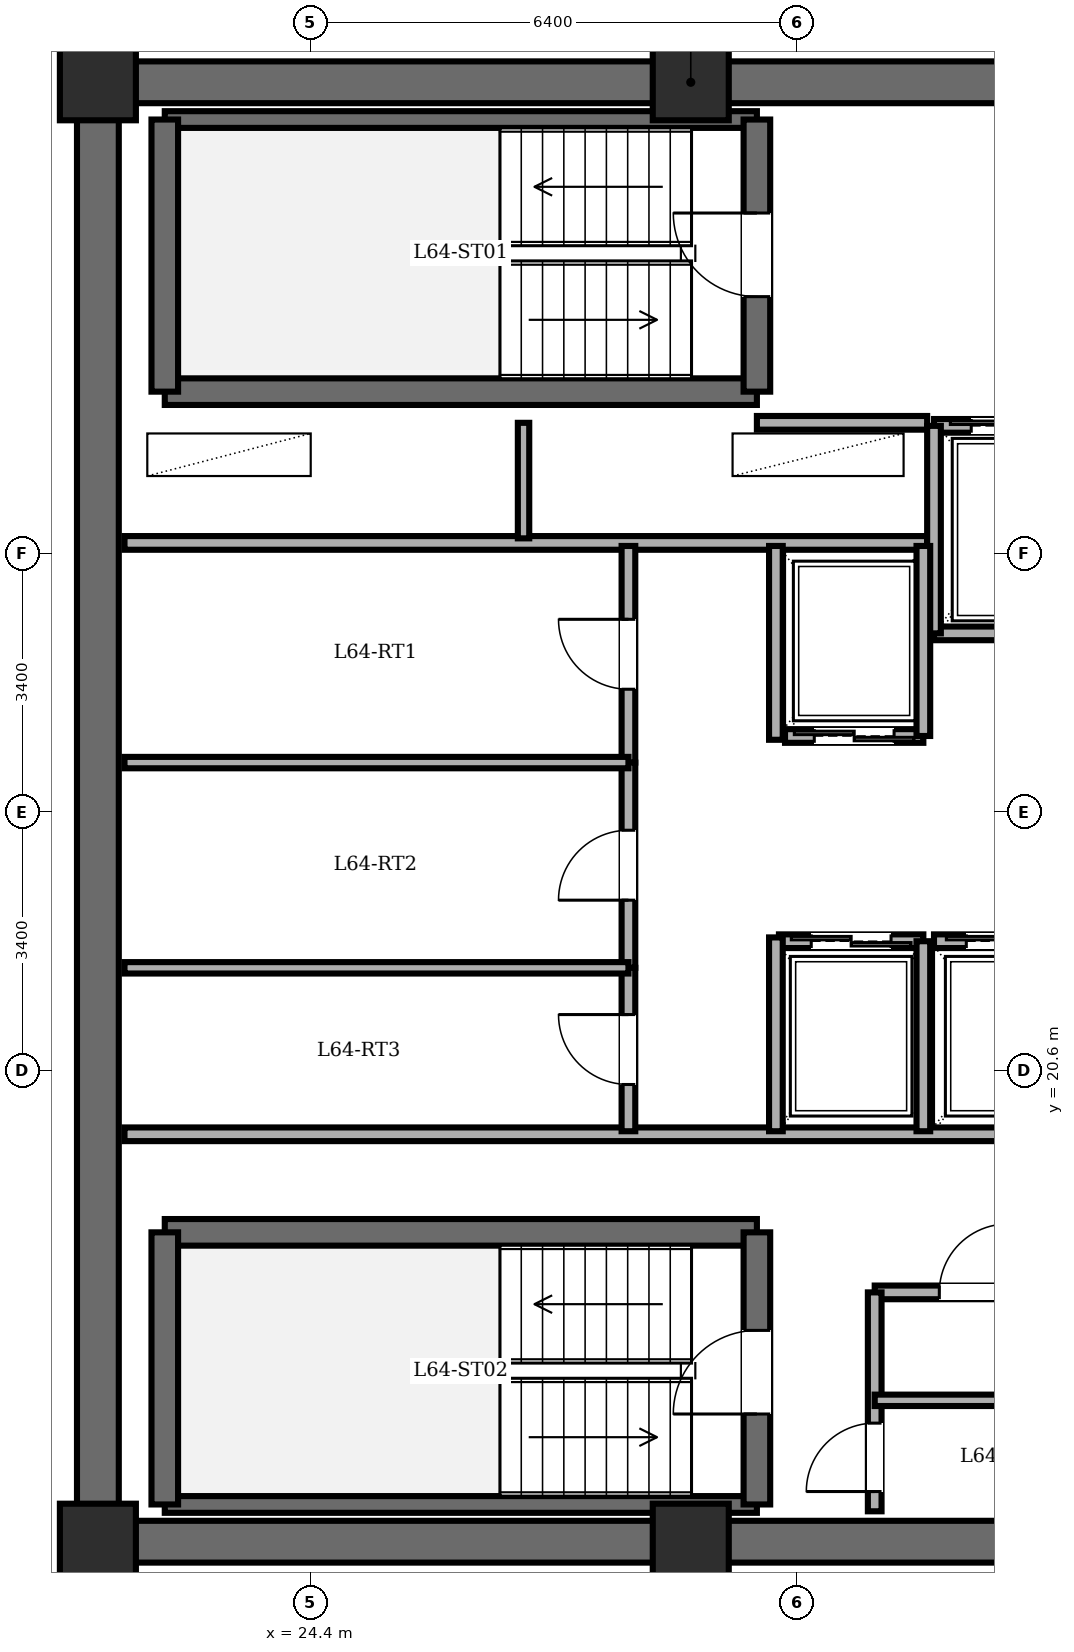
"""IFC4 building model, lengths in metres.
Left out: names, types, materials, properties, quantities, classifications, styles, units other than length and angle.
Written with IfcOpenShell. Run it as: python <this file> out.ifc"""

import sys

from ifc_helpers import new_model, si_unit, direction, frame, frame_2d, origin, origin_2d, place, context, subcontext, project, spatial, rectangle, extrude, element, fill, save


model = new_model("IFC4")
c1 = context("Model", 3, precision=1e-05, world=origin(), true_north=direction((0.0, 1.0)))
c2 = subcontext(c1, "Body", "Model", "MODEL_VIEW")
j1 = project(units=[si_unit("LENGTHUNIT", "METRE"), si_unit("PLANEANGLEUNIT", "RADIAN")], contexts=[c1])
p1 = place(None, origin())
s1 = spatial("IfcSite", under=j1, at=p1, CompositionType="ELEMENT")
p2 = place(p1, origin())
s2 = spatial("IfcBuilding", under=s1, at=p2, CompositionType="ELEMENT")
p3 = place(p2, frame((0.0, 0.0, 244.5)))
s3 = spatial("IfcBuildingStorey", under=s2, at=p3, CompositionType="ELEMENT", Elevation=244.5)
for number, where, z_axis, x_axis in (
    (1, (21.6, 14.4, 0.0), (0.0, 0.0, 1.0), (1.0, 0.0, 0.0)),
    (2, (29.4, 14.4, 0.0), (0.0, 0.0, 1.0), (1.0, 0.0, 0.0)),
    (3, (29.4, 33.6, 0.0), (0.0, 0.0, 1.0), (1.0, 0.0, 0.0)),
    (4, (21.6, 33.6, 0.0), (0.0, 0.0, 1.0), (1.0, 0.0, 0.0)),
):
    element("IfcColumn", number, at=place(p3, frame(where, z_axis=z_axis, x_axis=x_axis)), inside=s3, PredefinedType="COLUMN", context=c2, shape_type="SweptSolid", body=[
        extrude(rectangle(XDim=1.0, YDim=1.0, at=origin_2d()), origin(), (0.0, 0.0, 1.0), 3.6),
    ])
p4 = place(p3, frame((21.6, 14.4, 0.0), z_axis=(0.0, 0.0, 1.0), x_axis=(0.0, 1.0, 0.0)))
e5 = element("IfcWall", 5, at=p4, inside=s3, PredefinedType="SHEAR", context=c2, shape_type="SweptSolid", body=[
    extrude(rectangle(XDim=19.2, YDim=0.55, at=frame_2d((9.6, 0.0))), origin(), (0.0, 0.0, 1.0), 3.36),
])
for number, where, z_axis, x_axis in (
    (6, (21.6, 33.6, 0.0), (0.0, 0.0, 1.0), (1.0, 0.0, 0.0)),
    (7, (37.2, 14.4, 0.0), (0.0, 0.0, 1.0), (-1.0, 0.0, 0.0)),
):
    element("IfcWall", number, at=place(p3, frame(where, z_axis=z_axis, x_axis=x_axis)), inside=s3, PredefinedType="SHEAR", context=c2, shape_type="SweptSolid", body=[
        extrude(rectangle(XDim=15.6, YDim=0.55, at=frame_2d((7.8, 0.0))), origin(), (0.0, 0.0, 1.0), 3.36),
    ])
p5 = place(p3, frame((22.48, 29.53, 0.0), z_axis=(0.0, 0.0, 1.0), x_axis=(1.0, 0.0, 0.0)))
e8 = element("IfcWall", 8, at=p5, inside=s3, PredefinedType="SOLIDWALL", context=c2, shape_type="SweptSolid", body=[
    extrude(rectangle(XDim=7.79, YDim=0.35, at=frame_2d((3.895, 0.0))), origin(), (0.0, 0.0, 1.0), 3.36),
])
p6 = place(p3, frame((22.48, 33.11, 0.0), z_axis=(0.0, 0.0, 1.0), x_axis=(1.0, 0.0, 0.0)))
e9 = element("IfcWall", 9, at=p6, inside=s3, PredefinedType="PARTITIONING", context=c2, shape_type="SweptSolid", body=[
    extrude(rectangle(XDim=7.79, YDim=0.22, at=frame_2d((3.895, 0.0))), origin(), (0.0, 0.0, 1.0), 3.36),
])
p7 = place(p3, frame((22.48, 29.53, 0.0), z_axis=(0.0, 0.0, 1.0), x_axis=(0.0, 1.0, 0.0)))
e10 = element("IfcWall", 10, at=p7, inside=s3, PredefinedType="SOLIDWALL", context=c2, shape_type="SweptSolid", body=[
    extrude(rectangle(XDim=3.58, YDim=0.35, at=frame_2d((1.79, 0.0))), origin(), (0.0, 0.0, 1.0), 3.36),
])
p8 = place(p3, frame((30.27, 29.53, 0.0), z_axis=(0.0, 0.0, 1.0), x_axis=(0.0, 1.0, 0.0)))
e11 = element("IfcWall", 11, at=p8, inside=s3, PredefinedType="SOLIDWALL", context=c2, shape_type="SweptSolid", body=[
    extrude(rectangle(XDim=3.58, YDim=0.35, at=frame_2d((1.79, 0.0))), origin(), (0.0, 0.0, 1.0), 3.36),
])
p9 = place(p8, frame((1.25, 0.0, 0.0)))
e12 = element("IfcOpeningElement", 12, at=p9, cuts=e11, PredefinedType="OPENING", context=c2, shape_type="SweptSolid", body=[
    extrude(rectangle(XDim=1.1, YDim=2.15, at=frame_2d((0.55, 1.075))), frame((0.0, 0.185, 0.0), z_axis=(0.0, -1.0, 0.0), x_axis=(1.0, 0.0, 0.0)), (0.0, 0.0, 1.0), 0.37),
])
p10 = place(p3, frame((22.48, 18.47, 0.0), z_axis=(0.0, 0.0, 1.0), x_axis=(1.0, 0.0, 0.0)))
e13 = element("IfcWall", 13, at=p10, inside=s3, PredefinedType="SOLIDWALL", context=c2, shape_type="SweptSolid", body=[
    extrude(rectangle(XDim=7.79, YDim=0.35, at=frame_2d((3.895, 0.0))), origin(), (0.0, 0.0, 1.0), 3.36),
])
p11 = place(p3, frame((22.48, 14.89, 0.0), z_axis=(0.0, 0.0, 1.0), x_axis=(1.0, 0.0, 0.0)))
e14 = element("IfcWall", 14, at=p11, inside=s3, PredefinedType="PARTITIONING", context=c2, shape_type="SweptSolid", body=[
    extrude(rectangle(XDim=7.79, YDim=0.22, at=frame_2d((3.895, 0.0))), origin(), (0.0, 0.0, 1.0), 3.36),
])
p12 = place(p3, frame((22.48, 14.89, 0.0), z_axis=(0.0, 0.0, 1.0), x_axis=(0.0, 1.0, 0.0)))
e15 = element("IfcWall", 15, at=p12, inside=s3, PredefinedType="SOLIDWALL", context=c2, shape_type="SweptSolid", body=[
    extrude(rectangle(XDim=3.58, YDim=0.35, at=frame_2d((1.79, 0.0))), origin(), (0.0, 0.0, 1.0), 3.36),
])
p13 = place(p3, frame((30.27, 14.89, 0.0), z_axis=(0.0, 0.0, 1.0), x_axis=(0.0, 1.0, 0.0)))
e16 = element("IfcWall", 16, at=p13, inside=s3, PredefinedType="SOLIDWALL", context=c2, shape_type="SweptSolid", body=[
    extrude(rectangle(XDim=3.58, YDim=0.35, at=frame_2d((1.79, 0.0))), origin(), (0.0, 0.0, 1.0), 3.36),
])
p14 = place(p13, frame((1.19, 0.0, 0.0)))
e17 = element("IfcOpeningElement", 17, at=p14, cuts=e16, PredefinedType="OPENING", context=c2, shape_type="SweptSolid", body=[
    extrude(rectangle(XDim=1.1, YDim=2.15, at=frame_2d((0.55, 1.075))), frame((0.0, 0.185, 0.0), z_axis=(0.0, -1.0, 0.0), x_axis=(1.0, 0.0, 0.0)), (0.0, 0.0, 1.0), 0.37),
])
p15 = place(p3, frame((30.27, 29.12, 0.0), z_axis=(0.0, 0.0, 1.0), x_axis=(1.0, 0.0, 0.0)))
e18 = element("IfcWall", 18, at=p15, inside=s3, PredefinedType="PARTITIONING", context=c2, shape_type="SweptSolid", body=[
    extrude(rectangle(XDim=2.24, YDim=0.18, at=frame_2d((1.12, 0.0))), origin(), (0.0, 0.0, 1.0), 3.36),
])
p16 = place(p3, frame((21.95, 27.54, 0.0), z_axis=(0.0, 0.0, 1.0), x_axis=(1.0, 0.0, 0.0)))
e19 = element("IfcWall", 19, at=p16, inside=s3, PredefinedType="PARTITIONING", context=c2, shape_type="SweptSolid", body=[
    extrude(rectangle(XDim=10.56, YDim=0.18, at=frame_2d((5.28, 0.0))), origin(), (0.0, 0.0, 1.0), 3.36),
])
p17 = place(p3, frame((27.2, 27.6, 0.0), z_axis=(0.0, 0.0, 1.0), x_axis=(0.0, 1.0, 0.0)))
e20 = element("IfcWall", 20, at=p17, inside=s3, PredefinedType="PARTITIONING", context=c2, shape_type="SweptSolid", body=[
    extrude(rectangle(XDim=1.52, YDim=0.15, at=frame_2d((0.76, 0.0))), origin(), (0.0, 0.0, 1.0), 3.36),
])
p18 = place(p3, frame((21.95, 19.76, 0.0), z_axis=(0.0, 0.0, 1.0), x_axis=(1.0, 0.0, 0.0)))
e21 = element("IfcWall", 21, at=p18, inside=s3, PredefinedType="PARTITIONING", context=c2, shape_type="SweptSolid", body=[
    extrude(rectangle(XDim=14.87, YDim=0.18, at=frame_2d((7.435, 0.0))), origin(), (0.0, 0.0, 1.0), 3.36),
])
p19 = place(p3, frame((31.82, 17.68, 0.0), z_axis=(0.0, 0.0, 1.0), x_axis=(1.0, 0.0, 0.0)))
e22 = element("IfcWall", 22, at=p19, inside=s3, PredefinedType="PARTITIONING", context=c2, shape_type="SweptSolid", body=[
    extrude(rectangle(XDim=2.66, YDim=0.18, at=frame_2d((1.33, 0.0))), origin(), (0.0, 0.0, 1.0), 3.36),
])
p20 = place(p19, frame((0.85, 0.0, 0.0)))
e23 = element("IfcOpeningElement", 23, at=p20, cuts=e22, PredefinedType="OPENING", context=c2, shape_type="SweptSolid", body=[
    extrude(rectangle(XDim=0.9, YDim=2.05, at=frame_2d((0.45, 1.025))), frame((0.0, 0.1, 0.0), z_axis=(0.0, -1.0, 0.0), x_axis=(1.0, 0.0, 0.0)), (0.0, 0.0, 1.0), 0.2),
])
p21 = place(p3, frame((31.82, 14.8, 0.0), z_axis=(0.0, 0.0, 1.0), x_axis=(0.0, 1.0, 0.0)))
e24 = element("IfcWall", 24, at=p21, inside=s3, PredefinedType="PARTITIONING", context=c2, shape_type="SweptSolid", body=[
    extrude(rectangle(XDim=2.88, YDim=0.18, at=frame_2d((1.44, 0.0))), origin(), (0.0, 0.0, 1.0), 3.36),
])
p22 = place(p21, frame((0.26, 0.0, 0.0)))
e25 = element("IfcOpeningElement", 25, at=p22, cuts=e24, PredefinedType="OPENING", context=c2, shape_type="SweptSolid", body=[
    extrude(rectangle(XDim=0.9, YDim=2.05, at=frame_2d((0.45, 1.025))), frame((0.0, 0.1, 0.0), z_axis=(0.0, -1.0, 0.0), x_axis=(1.0, 0.0, 0.0)), (0.0, 0.0, 1.0), 0.2),
])
p23 = place(p3, frame((31.82, 16.26, 0.0), z_axis=(0.0, 0.0, 1.0), x_axis=(1.0, 0.0, 0.0)))
e26 = element("IfcWall", 26, at=p23, inside=s3, PredefinedType="PARTITIONING", context=c2, shape_type="SweptSolid", body=[
    extrude(rectangle(XDim=2.66, YDim=0.15, at=frame_2d((1.33, 0.0))), origin(), (0.0, 0.0, 1.0), 3.36),
])
p24 = place(p3, frame((32.6, 29.08, 0.0), z_axis=(0.0, 0.0, 1.0), x_axis=(1.0, 0.0, 0.0)))
e27 = element("IfcWall", 27, at=p24, inside=s3, PredefinedType="PARTITIONING", context=c2, shape_type="SweptSolid", body=[
    extrude(rectangle(XDim=2.08, YDim=0.18, at=frame_2d((1.04, 0.0))), origin(), (0.0, 0.0, 1.0), 3.36),
])
p25 = place(p24, frame((0.49, 0.0, 0.0)))
e28 = element("IfcOpeningElement", 28, at=p25, cuts=e27, PredefinedType="OPENING", context=c2, shape_type="SweptSolid", body=[
    extrude(rectangle(XDim=1.1, YDim=2.2, at=frame_2d((0.55, 1.1))), frame((0.0, 0.1, 0.0), z_axis=(0.0, -1.0, 0.0), x_axis=(1.0, 0.0, 0.0)), (0.0, 0.0, 1.0), 0.2),
])
p26 = place(p3, frame((34.68, 26.35, 0.0), z_axis=(0.0, 0.0, 1.0), x_axis=(-1.0, 0.0, 0.0)))
e29 = element("IfcWall", 29, at=p26, inside=s3, PredefinedType="PARTITIONING", context=c2, shape_type="SweptSolid", body=[
    extrude(rectangle(XDim=2.08, YDim=0.18, at=frame_2d((1.04, 0.0))), origin(), (0.0, 0.0, 1.0), 3.36),
])
p27 = place(p3, frame((32.6, 29.08, 0.0), z_axis=(0.0, 0.0, 1.0), x_axis=(0.0, -1.0, 0.0)))
e30 = element("IfcWall", 30, at=p27, inside=s3, PredefinedType="PARTITIONING", context=c2, shape_type="SweptSolid", body=[
    extrude(rectangle(XDim=2.73, YDim=0.18, at=frame_2d((1.365, 0.0))), origin(), (0.0, 0.0, 1.0), 3.36),
])
p28 = place(p3, frame((32.46, 25.0, 0.0), z_axis=(0.0, 0.0, 1.0), x_axis=(-1.0, 0.0, 0.0)))
e31 = element("IfcWall", 31, at=p28, inside=s3, PredefinedType="PARTITIONING", context=c2, shape_type="SweptSolid", body=[
    extrude(rectangle(XDim=1.82, YDim=0.18, at=frame_2d((0.91, 0.0))), origin(), (0.0, 0.0, 1.0), 3.36),
])
p29 = place(p28, frame((0.385, 0.0, 0.0)))
e32 = element("IfcOpeningElement", 32, at=p29, cuts=e31, PredefinedType="OPENING", context=c2, shape_type="SweptSolid", body=[
    extrude(rectangle(XDim=1.05, YDim=2.2, at=frame_2d((0.525, 1.1))), frame((0.0, 0.1, 0.0), z_axis=(0.0, -1.0, 0.0), x_axis=(1.0, 0.0, 0.0)), (0.0, 0.0, 1.0), 0.2),
])
p30 = place(p3, frame((32.46, 25.0, 0.0), z_axis=(0.0, 0.0, 1.0), x_axis=(0.0, 1.0, 0.0)))
e33 = element("IfcWall", 33, at=p30, inside=s3, PredefinedType="PARTITIONING", context=c2, shape_type="SweptSolid", body=[
    extrude(rectangle(XDim=2.5, YDim=0.18, at=frame_2d((1.25, 0.0))), origin(), (0.0, 0.0, 1.0), 3.36),
])
p31 = place(p3, frame((30.56, 22.3, 0.0), z_axis=(0.0, 0.0, 1.0), x_axis=(1.0, 0.0, 0.0)))
e34 = element("IfcWall", 34, at=p31, inside=s3, PredefinedType="PARTITIONING", context=c2, shape_type="SweptSolid", body=[
    extrude(rectangle(XDim=1.9, YDim=0.18, at=frame_2d((0.95, 0.0))), origin(), (0.0, 0.0, 1.0), 3.36),
])
p32 = place(p31, frame((0.425, 0.0, 0.0)))
e35 = element("IfcOpeningElement", 35, at=p32, cuts=e34, PredefinedType="OPENING", context=c2, shape_type="SweptSolid", body=[
    extrude(rectangle(XDim=1.05, YDim=2.2, at=frame_2d((0.525, 1.1))), frame((0.0, 0.1, 0.0), z_axis=(0.0, -1.0, 0.0), x_axis=(1.0, 0.0, 0.0)), (0.0, 0.0, 1.0), 0.2),
])
p33 = place(p3, frame((32.46, 19.8, 0.0), z_axis=(0.0, 0.0, 1.0), x_axis=(0.0, 1.0, 0.0)))
e36 = element("IfcWall", 36, at=p33, inside=s3, PredefinedType="PARTITIONING", context=c2, shape_type="SweptSolid", body=[
    extrude(rectangle(XDim=2.5, YDim=0.18, at=frame_2d((1.25, 0.0))), origin(), (0.0, 0.0, 1.0), 3.36),
])
p34 = place(p3, frame((32.6, 22.3, 0.0), z_axis=(0.0, 0.0, 1.0), x_axis=(1.0, 0.0, 0.0)))
e37 = element("IfcWall", 37, at=p34, inside=s3, PredefinedType="PARTITIONING", context=c2, shape_type="SweptSolid", body=[
    extrude(rectangle(XDim=1.9, YDim=0.18, at=frame_2d((0.95, 0.0))), origin(), (0.0, 0.0, 1.0), 3.36),
])
p35 = place(p34, frame((0.425, 0.0, 0.0)))
e38 = element("IfcOpeningElement", 38, at=p35, cuts=e37, PredefinedType="OPENING", context=c2, shape_type="SweptSolid", body=[
    extrude(rectangle(XDim=1.05, YDim=2.2, at=frame_2d((0.525, 1.1))), frame((0.0, 0.1, 0.0), z_axis=(0.0, -1.0, 0.0), x_axis=(1.0, 0.0, 0.0)), (0.0, 0.0, 1.0), 0.2),
])
for number, where, z_axis, x_axis in (
    (39, (30.52, 24.95, 0.0), (0.0, 0.0, 1.0), (0.0, 1.0, 0.0)),
    (40, (30.52, 19.8, 0.0), (0.0, 0.0, 1.0), (0.0, 1.0, 0.0)),
):
    element("IfcWall", number, at=place(p3, frame(where, z_axis=z_axis, x_axis=x_axis)), inside=s3, PredefinedType="PARTITIONING", context=c2, shape_type="SweptSolid", body=[
        extrude(rectangle(XDim=2.55, YDim=0.18, at=frame_2d((1.275, 0.0))), origin(), (0.0, 0.0, 1.0), 3.36),
    ])
p36 = place(p3, frame((28.58, 24.65, 0.0), z_axis=(0.0, 0.0, 1.0), x_axis=(0.0, 1.0, 0.0)))
e41 = element("IfcWall", 41, at=p36, inside=s3, PredefinedType="PARTITIONING", context=c2, shape_type="SweptSolid", body=[
    extrude(rectangle(XDim=2.85, YDim=0.18, at=frame_2d((1.425, 0.0))), origin(), (0.0, 0.0, 1.0), 3.36),
])
p37 = place(p36, frame((0.965, 0.0, 0.0)))
e42 = element("IfcOpeningElement", 42, at=p37, cuts=e41, PredefinedType="OPENING", context=c2, shape_type="SweptSolid", body=[
    extrude(rectangle(XDim=0.92, YDim=2.1, at=frame_2d((0.46, 1.05))), frame((0.0, 0.1, 0.0), z_axis=(0.0, -1.0, 0.0), x_axis=(1.0, 0.0, 0.0)), (0.0, 0.0, 1.0), 0.2),
])
p38 = place(p3, frame((28.58, 21.95, 0.0), z_axis=(0.0, 0.0, 1.0), x_axis=(0.0, 1.0, 0.0)))
e43 = element("IfcWall", 43, at=p38, inside=s3, PredefinedType="PARTITIONING", context=c2, shape_type="SweptSolid", body=[
    extrude(rectangle(XDim=2.7, YDim=0.18, at=frame_2d((1.35, 0.0))), origin(), (0.0, 0.0, 1.0), 3.36),
])
p39 = place(p38, frame((0.89, 0.0, 0.0)))
e44 = element("IfcOpeningElement", 44, at=p39, cuts=e43, PredefinedType="OPENING", context=c2, shape_type="SweptSolid", body=[
    extrude(rectangle(XDim=0.92, YDim=2.1, at=frame_2d((0.46, 1.05))), frame((0.0, 0.1, 0.0), z_axis=(0.0, -1.0, 0.0), x_axis=(1.0, 0.0, 0.0)), (0.0, 0.0, 1.0), 0.2),
])
p40 = place(p3, frame((28.58, 19.8, 0.0), z_axis=(0.0, 0.0, 1.0), x_axis=(0.0, 1.0, 0.0)))
e45 = element("IfcWall", 45, at=p40, inside=s3, PredefinedType="PARTITIONING", context=c2, shape_type="SweptSolid", body=[
    extrude(rectangle(XDim=2.15, YDim=0.18, at=frame_2d((1.075, 0.0))), origin(), (0.0, 0.0, 1.0), 3.36),
])
p41 = place(p40, frame((0.615, 0.0, 0.0)))
e46 = element("IfcOpeningElement", 46, at=p41, cuts=e45, PredefinedType="OPENING", context=c2, shape_type="SweptSolid", body=[
    extrude(rectangle(XDim=0.92, YDim=2.1, at=frame_2d((0.46, 1.05))), frame((0.0, 0.1, 0.0), z_axis=(0.0, -1.0, 0.0), x_axis=(1.0, 0.0, 0.0)), (0.0, 0.0, 1.0), 0.2),
])
for number, where, z_axis, x_axis in (
    (47, (21.95, 24.65, 0.0), (0.0, 0.0, 1.0), (1.0, 0.0, 0.0)),
    (48, (21.95, 21.95, 0.0), (0.0, 0.0, 1.0), (1.0, 0.0, 0.0)),
):
    element("IfcWall", number, at=place(p3, frame(where, z_axis=z_axis, x_axis=x_axis)), inside=s3, PredefinedType="PARTITIONING", context=c2, shape_type="SweptSolid", body=[
        extrude(rectangle(XDim=6.63, YDim=0.15, at=frame_2d((3.315, 0.0))), origin(), (0.0, 0.0, 1.0), 3.36),
    ])
p42 = place(p9, origin())
e49 = element("IfcDoor", 49, at=p42, inside=s3, OperationType="SINGLE_SWING_RIGHT", PredefinedType="DOOR", context=c2, shape_type="SweptSolid", body=[
    extrude(rectangle(XDim=1.1, YDim=2.15, at=frame_2d((0.55, 1.075))), frame((0.0, 0.025, 0.0), z_axis=(0.0, -1.0, 0.0), x_axis=(1.0, 0.0, 0.0)), (0.0, 0.0, 1.0), 0.05),
])
fill(e12, e49)
p43 = place(p14, origin())
e50 = element("IfcDoor", 50, at=p43, inside=s3, OperationType="SINGLE_SWING_LEFT", PredefinedType="DOOR", context=c2, shape_type="SweptSolid", body=[
    extrude(rectangle(XDim=1.1, YDim=2.15, at=frame_2d((0.55, 1.075))), frame((0.0, 0.025, 0.0), z_axis=(0.0, -1.0, 0.0), x_axis=(1.0, 0.0, 0.0)), (0.0, 0.0, 1.0), 0.05),
])
fill(e17, e50)
p44 = place(p20, origin())
e51 = element("IfcDoor", 51, at=p44, inside=s3, OperationType="SINGLE_SWING_RIGHT", PredefinedType="DOOR", context=c2, shape_type="SweptSolid", body=[
    extrude(rectangle(XDim=0.9, YDim=2.05, at=frame_2d((0.45, 1.025))), frame((0.0, 0.025, 0.0), z_axis=(0.0, -1.0, 0.0), x_axis=(1.0, 0.0, 0.0)), (0.0, 0.0, 1.0), 0.05),
])
fill(e23, e51)
p45 = place(p22, origin())
e52 = element("IfcDoor", 52, at=p45, inside=s3, OperationType="SINGLE_SWING_LEFT", PredefinedType="DOOR", context=c2, shape_type="SweptSolid", body=[
    extrude(rectangle(XDim=0.9, YDim=2.05, at=frame_2d((0.45, 1.025))), frame((0.0, 0.025, 0.0), z_axis=(0.0, -1.0, 0.0), x_axis=(1.0, 0.0, 0.0)), (0.0, 0.0, 1.0), 0.05),
])
fill(e25, e52)
p46 = place(p25, origin())
e53 = element("IfcDoor", 53, at=p46, inside=s3, OperationType="DOUBLE_DOOR_SLIDING", PredefinedType="DOOR", context=c2, shape_type="SweptSolid", body=[
    extrude(rectangle(XDim=1.1, YDim=2.2, at=frame_2d((0.55, 1.1))), frame((0.0, 0.025, 0.0), z_axis=(0.0, -1.0, 0.0), x_axis=(1.0, 0.0, 0.0)), (0.0, 0.0, 1.0), 0.05),
])
fill(e28, e53)
p47 = place(p29, origin())
e54 = element("IfcDoor", 54, at=p47, inside=s3, OperationType="DOUBLE_DOOR_SLIDING", PredefinedType="DOOR", context=c2, shape_type="SweptSolid", body=[
    extrude(rectangle(XDim=1.05, YDim=2.2, at=frame_2d((0.525, 1.1))), frame((0.0, 0.025, 0.0), z_axis=(0.0, -1.0, 0.0), x_axis=(1.0, 0.0, 0.0)), (0.0, 0.0, 1.0), 0.05),
])
fill(e32, e54)
p48 = place(p32, origin())
e55 = element("IfcDoor", 55, at=p48, inside=s3, OperationType="DOUBLE_DOOR_SLIDING", PredefinedType="DOOR", context=c2, shape_type="SweptSolid", body=[
    extrude(rectangle(XDim=1.05, YDim=2.2, at=frame_2d((0.525, 1.1))), frame((0.0, 0.025, 0.0), z_axis=(0.0, -1.0, 0.0), x_axis=(1.0, 0.0, 0.0)), (0.0, 0.0, 1.0), 0.05),
])
fill(e35, e55)
p49 = place(p35, origin())
e56 = element("IfcDoor", 56, at=p49, inside=s3, OperationType="DOUBLE_DOOR_SLIDING", PredefinedType="DOOR", context=c2, shape_type="SweptSolid", body=[
    extrude(rectangle(XDim=1.05, YDim=2.2, at=frame_2d((0.525, 1.1))), frame((0.0, 0.025, 0.0), z_axis=(0.0, -1.0, 0.0), x_axis=(1.0, 0.0, 0.0)), (0.0, 0.0, 1.0), 0.05),
])
fill(e38, e56)
p50 = place(p37, origin())
e57 = element("IfcDoor", 57, at=p50, inside=s3, OperationType="SINGLE_SWING_RIGHT", PredefinedType="DOOR", context=c2, shape_type="SweptSolid", body=[
    extrude(rectangle(XDim=0.92, YDim=2.1, at=frame_2d((0.46, 1.05))), frame((0.0, 0.025, 0.0), z_axis=(0.0, -1.0, 0.0), x_axis=(1.0, 0.0, 0.0)), (0.0, 0.0, 1.0), 0.05),
])
fill(e42, e57)
p51 = place(p39, origin())
e58 = element("IfcDoor", 58, at=p51, inside=s3, OperationType="SINGLE_SWING_LEFT", PredefinedType="DOOR", context=c2, shape_type="SweptSolid", body=[
    extrude(rectangle(XDim=0.92, YDim=2.1, at=frame_2d((0.46, 1.05))), frame((0.0, 0.025, 0.0), z_axis=(0.0, -1.0, 0.0), x_axis=(1.0, 0.0, 0.0)), (0.0, 0.0, 1.0), 0.05),
])
fill(e44, e58)
p52 = place(p41, origin())
e59 = element("IfcDoor", 59, at=p52, inside=s3, OperationType="SINGLE_SWING_RIGHT", PredefinedType="DOOR", context=c2, shape_type="SweptSolid", body=[
    extrude(rectangle(XDim=0.92, YDim=2.1, at=frame_2d((0.46, 1.05))), frame((0.0, 0.025, 0.0), z_axis=(0.0, -1.0, 0.0), x_axis=(1.0, 0.0, 0.0)), (0.0, 0.0, 1.0), 0.05),
])
fill(e46, e59)
save(model, sys.argv[1])
